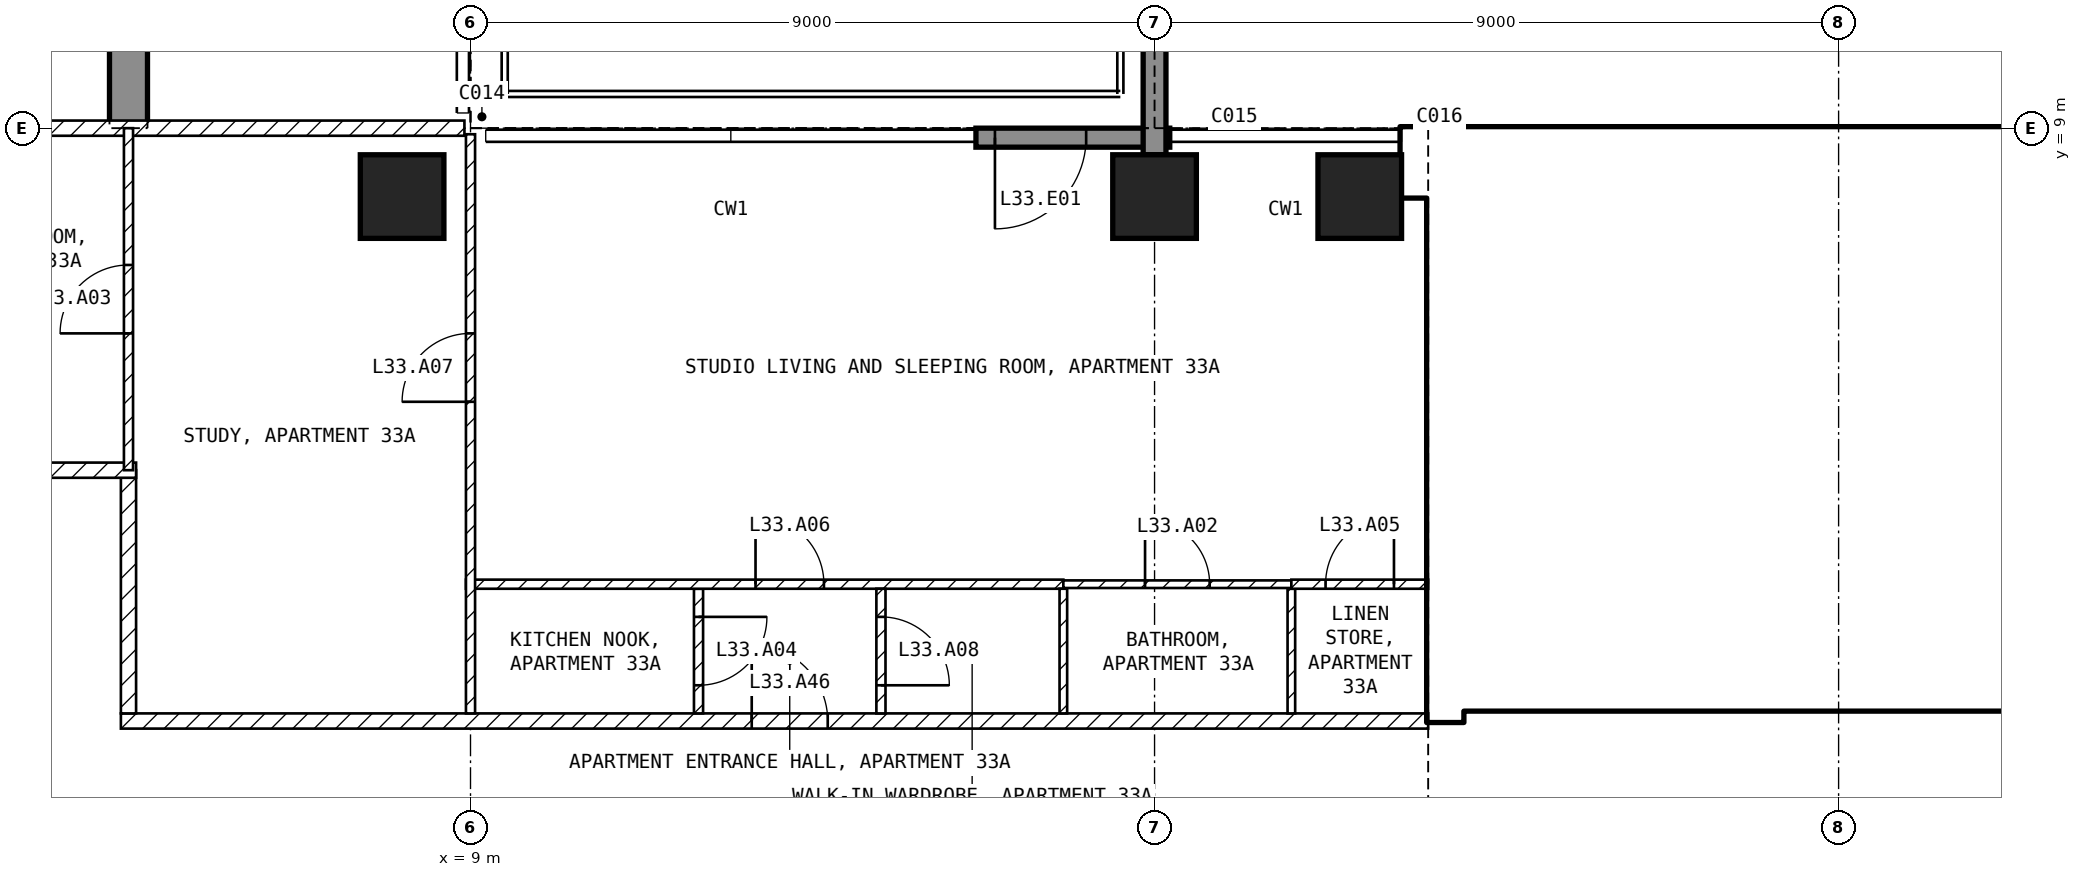
"""IFC4 building model, lengths in metres.
Left out: names, types, materials, properties, quantities, classifications, styles, units other than length and angle.
Written with IfcOpenShell. Run it as: python <this file> out.ifc"""

import sys

from ifc_helpers import new_model, si_unit, direction, frame, frame_2d, origin, origin_2d, place, context, subcontext, project, spatial, polyline, rectangle, outline, extrude, element, fill, save


model = new_model("IFC4")
c1 = context("Model", 3, precision=1e-05, world=origin(), true_north=direction((0.0, 1.0)))
c2 = subcontext(c1, "Body", "Model", "MODEL_VIEW")
j1 = project(units=[si_unit("LENGTHUNIT", "METRE"), si_unit("PLANEANGLEUNIT", "RADIAN")], contexts=[c1])
p1 = place(None, origin())
s1 = spatial("IfcSite", under=j1, at=p1, CompositionType="ELEMENT")
p2 = place(p1, origin())
s2 = spatial("IfcBuilding", under=s1, at=p2, CompositionType="ELEMENT")
p3 = place(p2, frame((0.0, 0.0, 137.4)))
s3 = spatial("IfcBuildingStorey", under=s2, at=p3, CompositionType="ELEMENT", Elevation=137.4)
for number, where, z_axis, x_axis in (
    (1, (8.1, 8.1, -0.25), (0.0, 0.0, 1.0), (1.0, 0.0, 0.0)),
    (2, (18.0, 8.1, -0.25), (0.0, 0.0, 1.0), (1.0, 0.0, 0.0)),
    (3, (20.7, 8.1, -0.25), (0.0, 0.0, 1.0), (1.0, 0.0, 0.0)),
):
    element("IfcColumn", number, at=place(p3, frame(where, z_axis=z_axis, x_axis=x_axis)), inside=s3, PredefinedType="COLUMN", context=c2, shape_type="SweptSolid", body=[
        extrude(rectangle(XDim=1.1, YDim=1.1, at=origin_2d()), origin(), (0.0, 0.0, 1.0), 3.5),
    ])
p4 = place(p3, frame((4.25, 9.0, -0.25), z_axis=(1.0, 0.0, 0.0), x_axis=(0.0, 1.0, 0.0)))
e4 = element("IfcWall", 4, at=p4, inside=s3, PredefinedType="SHEAR", context=c2, shape_type="SweptSolid", body=[
    extrude(outline(polyline([(0.0, 0.0), (2.1, 0.0), (2.1, 2.65), (4.5, 2.65), (4.5, 0.0), (9.9, 0.0), (9.9, 2.65), (12.3, 2.65), (12.3, 0.0), (16.55, 0.0), (16.55, 3.5), (0.0, 3.5), (0.0, 0.0)])), origin(), (0.0, 0.0, 1.0), 0.5),
])
p5 = place(p3, frame((18.2, 8.875, 0.0), z_axis=(0.0, 0.0, 1.0), x_axis=(-1.0, 0.0, 0.0)))
e5 = element("IfcWall", 5, at=p5, inside=s3, PredefinedType="SOLIDWALL", context=c2, shape_type="SweptSolid", body=[
    extrude(rectangle(XDim=2.55, YDim=0.25, at=frame_2d((1.275, 0.0))), origin(), (0.0, 0.0, 1.0), 3.25),
])
p6 = place(p5, frame((1.1, 0.0, 0.0)))
e6 = element("IfcOpeningElement", 6, at=p6, cuts=e5, PredefinedType="OPENING", context=c2, shape_type="SweptSolid", body=[
    extrude(rectangle(XDim=1.2, YDim=2.4, at=frame_2d((0.6, 1.2))), frame((0.0, 0.135, 0.0), z_axis=(0.0, -1.0, 0.0), x_axis=(1.0, 0.0, 0.0)), (0.0, 0.0, 1.0), 0.27),
])
p7 = place(p3, frame((18.0, 8.65, 0.0), z_axis=(0.0, 0.0, 1.0), x_axis=(0.0, 1.0, 0.0)))
e7 = element("IfcWall", 7, at=p7, inside=s3, PredefinedType="SOLIDWALL", context=c2, shape_type="SweptSolid", body=[
    extrude(rectangle(XDim=3.09, YDim=0.3, at=frame_2d((1.545, 0.0))), origin(), (0.0, 0.0, 1.0), 3.25),
])
p8 = place(p3, frame((21.25, 8.55, 0.0), z_axis=(0.0, 0.0, 1.0), x_axis=(1.0, 0.0, 0.0)))
e8 = element("IfcWall", 8, at=p8, inside=s3, PredefinedType="SHEAR", context=c2, shape_type="SweptSolid", body=[
    extrude(rectangle(XDim=8.2, YDim=0.9, at=frame_2d((4.1, 0.0))), origin(), (0.0, 0.0, 1.0), 3.25),
])
p9 = place(p3, frame((21.825, 1.2, 0.0), z_axis=(0.0, 0.0, 1.0), x_axis=(0.0, 1.0, 0.0)))
e9 = element("IfcWall", 9, at=p9, inside=s3, PredefinedType="SHEAR", context=c2, shape_type="SweptSolid", body=[
    extrude(rectangle(XDim=6.9, YDim=0.45, at=frame_2d((3.45, 0.0))), origin(), (0.0, 0.0, 1.0), 3.25),
])
p10 = place(p3, frame((22.05, 1.45, 0.0), z_axis=(0.0, 0.0, 1.0), x_axis=(1.0, 0.0, 0.0)))
e10 = element("IfcWall", 10, at=p10, inside=s3, PredefinedType="SOLIDWALL", context=c2, shape_type="SweptSolid", body=[
    extrude(rectangle(XDim=11.0, YDim=0.2, at=frame_2d((5.5, 0.0))), origin(), (0.0, 0.0, 1.0), 3.25),
])
p11 = place(p10, frame((0.75, 0.0, 0.0)))
e11 = element("IfcOpeningElement", 11, at=p11, cuts=e10, PredefinedType="OPENING", context=c2, shape_type="SweptSolid", body=[
    extrude(rectangle(XDim=1.0, YDim=2.1, at=frame_2d((0.5, 1.05))), frame((0.0, 0.11, 0.0), z_axis=(0.0, -1.0, 0.0), x_axis=(1.0, 0.0, 0.0)), (0.0, 0.0, 1.0), 0.22),
])
p12 = place(p10, frame((3.25, 0.0, 0.0)))
e12 = element("IfcOpeningElement", 12, at=p12, cuts=e10, PredefinedType="OPENING", context=c2, shape_type="SweptSolid", body=[
    extrude(rectangle(XDim=1.0, YDim=2.1, at=frame_2d((0.5, 1.05))), frame((0.0, 0.11, 0.0), z_axis=(0.0, -1.0, 0.0), x_axis=(1.0, 0.0, 0.0)), (0.0, 0.0, 1.0), 0.22),
])
p13 = place(p10, frame((9.075, 0.0, 0.0)))
e13 = element("IfcOpeningElement", 13, at=p13, cuts=e10, PredefinedType="OPENING", context=c2, shape_type="SweptSolid", body=[
    extrude(rectangle(XDim=0.9, YDim=2.1, at=frame_2d((0.45, 1.05))), frame((0.0, 0.11, 0.0), z_axis=(0.0, -1.0, 0.0), x_axis=(1.0, 0.0, 0.0)), (0.0, 0.0, 1.0), 0.22),
])
p14 = place(p3, frame((22.05, 5.15, 0.0), z_axis=(0.0, 0.0, 1.0), x_axis=(1.0, 0.0, 0.0)))
e14 = element("IfcWall", 14, at=p14, inside=s3, PredefinedType="SOLIDWALL", context=c2, shape_type="SweptSolid", body=[
    extrude(rectangle(XDim=6.3, YDim=0.2, at=frame_2d((3.15, 0.0))), origin(), (0.0, 0.0, 1.0), 3.25),
])
p15 = place(p14, frame((0.2, 0.0, 0.0)))
e15 = element("IfcOpeningElement", 15, at=p15, cuts=e14, PredefinedType="OPENING", context=c2, shape_type="SweptSolid", body=[
    extrude(rectangle(XDim=1.0, YDim=2.1, at=frame_2d((0.5, 1.05))), frame((0.0, 0.11, 0.0), z_axis=(0.0, -1.0, 0.0), x_axis=(1.0, 0.0, 0.0)), (0.0, 0.0, 1.0), 0.22),
])
p16 = place(p3, frame((28.25, 5.25, 0.0), z_axis=(0.0, 0.0, 1.0), x_axis=(0.0, 1.0, 0.0)))
e16 = element("IfcWall", 16, at=p16, inside=s3, PredefinedType="SOLIDWALL", context=c2, shape_type="SweptSolid", body=[
    extrude(rectangle(XDim=2.85, YDim=0.2, at=frame_2d((1.425, 0.0))), origin(), (0.0, 0.0, 1.0), 3.25),
])
p17 = place(p3, frame((27.2, 3.95, 0.0), z_axis=(0.0, 0.0, 1.0), x_axis=(1.0, 0.0, 0.0)))
e17 = element("IfcWall", 17, at=p17, inside=s3, PredefinedType="SOLIDWALL", context=c2, shape_type="SweptSolid", body=[
    extrude(rectangle(XDim=5.85, YDim=0.2, at=frame_2d((2.925, 0.0))), origin(), (0.0, 0.0, 1.0), 3.25),
])
p18 = place(p3, frame((27.1, 1.55, 0.0), z_axis=(0.0, 0.0, 1.0), x_axis=(0.0, 1.0, 0.0)))
e18 = element("IfcWall", 18, at=p18, inside=s3, PredefinedType="SOLIDWALL", context=c2, shape_type="SweptSolid", body=[
    extrude(rectangle(XDim=3.5, YDim=0.2, at=frame_2d((1.75, 0.0))), origin(), (0.0, 0.0, 1.0), 3.25),
])
p19 = place(p18, frame((0.6, 0.0, 0.0)))
e19 = element("IfcOpeningElement", 19, at=p19, cuts=e18, PredefinedType="OPENING", context=c2, shape_type="SweptSolid", body=[
    extrude(rectangle(XDim=1.1, YDim=2.1, at=frame_2d((0.55, 1.05))), frame((0.0, 0.11, 0.0), z_axis=(0.0, -1.0, 0.0), x_axis=(1.0, 0.0, 0.0)), (0.0, 0.0, 1.0), 0.22),
])
p20 = place(p18, frame((2.6, 0.0, 0.0)))
e20 = element("IfcOpeningElement", 20, at=p20, cuts=e18, PredefinedType="OPENING", context=c2, shape_type="SweptSolid", body=[
    extrude(rectangle(XDim=0.8, YDim=2.1, at=frame_2d((0.4, 1.05))), frame((0.0, 0.11, 0.0), z_axis=(0.0, -1.0, 0.0), x_axis=(1.0, 0.0, 0.0)), (0.0, 0.0, 1.0), 0.22),
])
p21 = place(p3, frame((4.4, 1.2, 0.0), z_axis=(0.0, 0.0, 1.0), x_axis=(1.0, 0.0, 0.0)))
e21 = element("IfcWall", 21, at=p21, inside=s3, PredefinedType="PARTITIONING", context=c2, shape_type="SweptSolid", body=[
    extrude(rectangle(XDim=17.2, YDim=0.2, at=frame_2d((8.6, 0.0))), origin(), (0.0, 0.0, 1.0), 3.25),
])
p22 = place(p21, frame((8.3, 0.0, 0.0)))
e22 = element("IfcOpeningElement", 22, at=p22, cuts=e21, PredefinedType="OPENING", context=c2, shape_type="SweptSolid", body=[
    extrude(rectangle(XDim=1.0, YDim=2.1, at=frame_2d((0.5, 1.05))), frame((0.0, 0.11, 0.0), z_axis=(0.0, -1.0, 0.0), x_axis=(1.0, 0.0, 0.0)), (0.0, 0.0, 1.0), 0.22),
])
p23 = place(p3, frame((4.5, 4.5, 0.0), z_axis=(0.0, 0.0, 1.0), x_axis=(0.0, -1.0, 0.0)))
e23 = element("IfcWall", 23, at=p23, inside=s3, PredefinedType="PARTITIONING", context=c2, shape_type="SweptSolid", body=[
    extrude(rectangle(XDim=3.2, YDim=0.2, at=frame_2d((1.6, 0.0))), origin(), (0.0, 0.0, 1.0), 3.25),
])
p24 = place(p3, frame((1.1, 4.5, 0.0), z_axis=(0.0, 0.0, 1.0), x_axis=(1.0, 0.0, 0.0)))
e24 = element("IfcWall", 24, at=p24, inside=s3, PredefinedType="PARTITIONING", context=c2, shape_type="SweptSolid", body=[
    extrude(rectangle(XDim=3.5, YDim=0.2, at=frame_2d((1.75, 0.0))), origin(), (0.0, 0.0, 1.0), 3.25),
])
p25 = place(p3, frame((-8.92, 9.0, 0.0), z_axis=(0.0, 0.0, 1.0), x_axis=(1.0, 0.0, 0.0)))
e25 = element("IfcWall", 25, at=p25, inside=s3, PredefinedType="PARTITIONING", context=c2, shape_type="SweptSolid", body=[
    extrude(rectangle(XDim=17.84, YDim=0.2, at=frame_2d((8.92, 0.0))), origin(), (0.0, 0.0, 1.0), 3.25),
])
p26 = place(p25, frame((8.42, 0.0, 0.0)))
e26 = element("IfcOpeningElement", 26, at=p26, cuts=e25, PredefinedType="OPENING", context=c2, shape_type="SweptSolid", body=[
    extrude(rectangle(XDim=1.0, YDim=2.1, at=frame_2d((0.5, 1.05))), frame((0.0, 0.11, 0.0), z_axis=(0.0, -1.0, 0.0), x_axis=(1.0, 0.0, 0.0)), (0.0, 0.0, 1.0), 0.22),
])
p27 = place(p3, frame((12.0, 2.94, 0.0), z_axis=(0.0, 0.0, 1.0), x_axis=(0.0, -1.0, 0.0)))
e27 = element("IfcWall", 27, at=p27, inside=s3, PredefinedType="PARTITIONING", context=c2, shape_type="SweptSolid", body=[
    extrude(rectangle(XDim=1.64, YDim=0.12, at=frame_2d((0.82, 0.0))), origin(), (0.0, 0.0, 1.0), 3.25),
])
p28 = place(p27, frame((0.37, 0.0, 0.0)))
e28 = element("IfcOpeningElement", 28, at=p28, cuts=e27, PredefinedType="OPENING", context=c2, shape_type="SweptSolid", body=[
    extrude(rectangle(XDim=0.9, YDim=2.1, at=frame_2d((0.45, 1.05))), frame((0.0, 0.07, 0.0), z_axis=(0.0, -1.0, 0.0), x_axis=(1.0, 0.0, 0.0)), (0.0, 0.0, 1.0), 0.14),
])
p29 = place(p3, frame((8.94, 3.0, 0.0), z_axis=(0.0, 0.0, 1.0), x_axis=(1.0, 0.0, 0.0)))
e29 = element("IfcWall", 29, at=p29, inside=s3, PredefinedType="PARTITIONING", context=c2, shape_type="SweptSolid", body=[
    extrude(rectangle(XDim=7.86, YDim=0.12, at=frame_2d((3.93, 0.0))), origin(), (0.0, 0.0, 1.0), 3.25),
])
p30 = place(p29, frame((3.81, 0.0, 0.0)))
e30 = element("IfcOpeningElement", 30, at=p30, cuts=e29, PredefinedType="OPENING", context=c2, shape_type="SweptSolid", body=[
    extrude(rectangle(XDim=0.9, YDim=2.1, at=frame_2d((0.45, 1.05))), frame((0.0, 0.07, 0.0), z_axis=(0.0, -1.0, 0.0), x_axis=(1.0, 0.0, 0.0)), (0.0, 0.0, 1.0), 0.14),
])
p31 = place(p3, frame((9.0, 1.3, 0.0), z_axis=(0.0, 0.0, 1.0), x_axis=(0.0, 1.0, 0.0)))
e31 = element("IfcWall", 31, at=p31, inside=s3, PredefinedType="PARTITIONING", context=c2, shape_type="SweptSolid", body=[
    extrude(rectangle(XDim=7.62, YDim=0.12, at=frame_2d((3.81, 0.0))), origin(), (0.0, 0.0, 1.0), 3.25),
])
p32 = place(p31, frame((4.1, 0.0, 0.0)))
e32 = element("IfcOpeningElement", 32, at=p32, cuts=e31, PredefinedType="OPENING", context=c2, shape_type="SweptSolid", body=[
    extrude(rectangle(XDim=0.9, YDim=2.1, at=frame_2d((0.45, 1.05))), frame((0.0, 0.07, 0.0), z_axis=(0.0, -1.0, 0.0), x_axis=(1.0, 0.0, 0.0)), (0.0, 0.0, 1.0), 0.14),
])
p33 = place(p3, frame((14.4, 2.94, 0.0), z_axis=(0.0, 0.0, 1.0), x_axis=(0.0, -1.0, 0.0)))
e33 = element("IfcWall", 33, at=p33, inside=s3, PredefinedType="PARTITIONING", context=c2, shape_type="SweptSolid", body=[
    extrude(rectangle(XDim=1.64, YDim=0.12, at=frame_2d((0.82, 0.0))), origin(), (0.0, 0.0, 1.0), 3.25),
])
p34 = place(p33, frame((0.37, 0.0, 0.0)))
e34 = element("IfcOpeningElement", 34, at=p34, cuts=e33, PredefinedType="OPENING", context=c2, shape_type="SweptSolid", body=[
    extrude(rectangle(XDim=0.9, YDim=2.1, at=frame_2d((0.45, 1.05))), frame((0.0, 0.07, 0.0), z_axis=(0.0, -1.0, 0.0), x_axis=(1.0, 0.0, 0.0)), (0.0, 0.0, 1.0), 0.14),
])
for number, where, z_axis, x_axis in (
    (35, (16.8, 2.94, 0.0), (0.0, 0.0, 1.0), (0.0, -1.0, 0.0)),
    (36, (19.8, 2.94, 0.0), (0.0, 0.0, 1.0), (0.0, -1.0, 0.0)),
):
    element("IfcWall", number, at=place(p3, frame(where, z_axis=z_axis, x_axis=x_axis)), inside=s3, PredefinedType="PARTITIONING", context=c2, shape_type="SweptSolid", body=[
        extrude(rectangle(XDim=1.64, YDim=0.1, at=frame_2d((0.82, 0.0))), origin(), (0.0, 0.0, 1.0), 3.25),
    ])
p35 = place(p3, frame((16.8, 3.0, 0.0), z_axis=(0.0, 0.0, 1.0), x_axis=(1.0, 0.0, 0.0)))
e37 = element("IfcWall", 37, at=p35, inside=s3, PredefinedType="PARTITIONING", context=c2, shape_type="SweptSolid", body=[
    extrude(rectangle(XDim=3.0, YDim=0.1, at=frame_2d((1.5, 0.0))), origin(), (0.0, 0.0, 1.0), 3.25),
])
p36 = place(p35, frame((1.075, 0.0, 0.0)))
e38 = element("IfcOpeningElement", 38, at=p36, cuts=e37, PredefinedType="OPENING", context=c2, shape_type="SweptSolid", body=[
    extrude(rectangle(XDim=0.85, YDim=2.1, at=frame_2d((0.425, 1.05))), frame((0.0, 0.06, 0.0), z_axis=(0.0, -1.0, 0.0), x_axis=(1.0, 0.0, 0.0)), (0.0, 0.0, 1.0), 0.12),
])
p37 = place(p3, frame((19.8, 3.0, 0.0), z_axis=(0.0, 0.0, 1.0), x_axis=(1.0, 0.0, 0.0)))
e39 = element("IfcWall", 39, at=p37, inside=s3, PredefinedType="PARTITIONING", context=c2, shape_type="SweptSolid", body=[
    extrude(rectangle(XDim=1.8, YDim=0.12, at=frame_2d((0.9, 0.0))), origin(), (0.0, 0.0, 1.0), 3.25),
])
p38 = place(p37, frame((0.45, 0.0, 0.0)))
e40 = element("IfcOpeningElement", 40, at=p38, cuts=e39, PredefinedType="OPENING", context=c2, shape_type="SweptSolid", body=[
    extrude(rectangle(XDim=0.9, YDim=2.1, at=frame_2d((0.45, 1.05))), frame((0.0, 0.07, 0.0), z_axis=(0.0, -1.0, 0.0), x_axis=(1.0, 0.0, 0.0)), (0.0, 0.0, 1.0), 0.14),
])
p39 = place(p3, frame((4.5, 4.5, 0.0), z_axis=(0.0, 0.0, 1.0), x_axis=(0.0, 1.0, 0.0)))
e41 = element("IfcWall", 41, at=p39, inside=s3, PredefinedType="PARTITIONING", context=c2, shape_type="SweptSolid", body=[
    extrude(rectangle(XDim=4.5, YDim=0.12, at=frame_2d((2.25, 0.0))), origin(), (0.0, 0.0, 1.0), 3.25),
])
p40 = place(p39, frame((1.8, 0.0, 0.0)))
e42 = element("IfcOpeningElement", 42, at=p40, cuts=e41, PredefinedType="OPENING", context=c2, shape_type="SweptSolid", body=[
    extrude(rectangle(XDim=0.9, YDim=2.1, at=frame_2d((0.45, 1.05))), frame((0.0, 0.07, 0.0), z_axis=(0.0, -1.0, 0.0), x_axis=(1.0, 0.0, 0.0)), (0.0, 0.0, 1.0), 0.14),
])
p41 = place(p6, origin())
e43 = element("IfcDoor", 43, at=p41, inside=s3, OperationType="SINGLE_SWING_RIGHT", PredefinedType="DOOR", context=c2, shape_type="SweptSolid", body=[
    extrude(rectangle(XDim=1.2, YDim=2.4, at=frame_2d((0.6, 1.2))), frame((0.0, 0.025, 0.0), z_axis=(0.0, -1.0, 0.0), x_axis=(1.0, 0.0, 0.0)), (0.0, 0.0, 1.0), 0.05),
])
fill(e6, e43)
p42 = place(p19, origin())
e44 = element("IfcDoor", 44, at=p42, inside=s3, OperationType="DOUBLE_DOOR_SLIDING", PredefinedType="DOOR", context=c2, shape_type="SweptSolid", body=[
    extrude(rectangle(XDim=1.1, YDim=2.1, at=frame_2d((0.55, 1.05))), frame((0.0, 0.025, 0.0), z_axis=(0.0, -1.0, 0.0), x_axis=(1.0, 0.0, 0.0)), (0.0, 0.0, 1.0), 0.05),
])
fill(e19, e44)
p43 = place(p15, origin())
e45 = element("IfcDoor", 45, at=p43, inside=s3, OperationType="SINGLE_SWING_LEFT", PredefinedType="DOOR", context=c2, shape_type="SweptSolid", body=[
    extrude(rectangle(XDim=1.0, YDim=2.1, at=frame_2d((0.5, 1.05))), frame((0.0, 0.025, 0.0), z_axis=(0.0, -1.0, 0.0), x_axis=(1.0, 0.0, 0.0)), (0.0, 0.0, 1.0), 0.05),
])
fill(e15, e45)
p44 = place(p11, origin())
e46 = element("IfcDoor", 46, at=p44, inside=s3, OperationType="SINGLE_SWING_LEFT", PredefinedType="DOOR", context=c2, shape_type="SweptSolid", body=[
    extrude(rectangle(XDim=1.0, YDim=2.1, at=frame_2d((0.5, 1.05))), frame((0.0, 0.025, 0.0), z_axis=(0.0, -1.0, 0.0), x_axis=(1.0, 0.0, 0.0)), (0.0, 0.0, 1.0), 0.05),
])
fill(e11, e46)
p45 = place(p12, origin())
e47 = element("IfcDoor", 47, at=p45, inside=s3, OperationType="SINGLE_SWING_LEFT", PredefinedType="DOOR", context=c2, shape_type="SweptSolid", body=[
    extrude(rectangle(XDim=1.0, YDim=2.1, at=frame_2d((0.5, 1.05))), frame((0.0, 0.025, 0.0), z_axis=(0.0, -1.0, 0.0), x_axis=(1.0, 0.0, 0.0)), (0.0, 0.0, 1.0), 0.05),
])
fill(e12, e47)
p46 = place(p20, origin())
e48 = element("IfcDoor", 48, at=p46, inside=s3, OperationType="SINGLE_SWING_LEFT", PredefinedType="DOOR", context=c2, shape_type="SweptSolid", body=[
    extrude(rectangle(XDim=0.8, YDim=2.1, at=frame_2d((0.4, 1.05))), frame((0.0, 0.025, 0.0), z_axis=(0.0, -1.0, 0.0), x_axis=(1.0, 0.0, 0.0)), (0.0, 0.0, 1.0), 0.05),
])
fill(e20, e48)
p47 = place(p36, origin())
e49 = element("IfcDoor", 49, at=p47, inside=s3, OperationType="SINGLE_SWING_LEFT", PredefinedType="DOOR", context=c2, shape_type="SweptSolid", body=[
    extrude(rectangle(XDim=0.85, YDim=2.1, at=frame_2d((0.425, 1.05))), frame((0.0, 0.025, 0.0), z_axis=(0.0, -1.0, 0.0), x_axis=(1.0, 0.0, 0.0)), (0.0, 0.0, 1.0), 0.05),
])
fill(e38, e49)
p48 = place(p40, origin())
e50 = element("IfcDoor", 50, at=p48, inside=s3, OperationType="SINGLE_SWING_LEFT", PredefinedType="DOOR", context=c2, shape_type="SweptSolid", body=[
    extrude(rectangle(XDim=0.9, YDim=2.1, at=frame_2d((0.45, 1.05))), frame((0.0, 0.025, 0.0), z_axis=(0.0, -1.0, 0.0), x_axis=(1.0, 0.0, 0.0)), (0.0, 0.0, 1.0), 0.05),
])
fill(e42, e50)
p49 = place(p28, origin())
e51 = element("IfcDoor", 51, at=p49, inside=s3, OperationType="SINGLE_SWING_LEFT", PredefinedType="DOOR", context=c2, shape_type="SweptSolid", body=[
    extrude(rectangle(XDim=0.9, YDim=2.1, at=frame_2d((0.45, 1.05))), frame((0.0, 0.025, 0.0), z_axis=(0.0, -1.0, 0.0), x_axis=(1.0, 0.0, 0.0)), (0.0, 0.0, 1.0), 0.05),
])
fill(e28, e51)
p50 = place(p38, origin())
e52 = element("IfcDoor", 52, at=p50, inside=s3, OperationType="SINGLE_SWING_RIGHT", PredefinedType="DOOR", context=c2, shape_type="SweptSolid", body=[
    extrude(rectangle(XDim=0.9, YDim=2.1, at=frame_2d((0.45, 1.05))), frame((0.0, 0.025, 0.0), z_axis=(0.0, -1.0, 0.0), x_axis=(1.0, 0.0, 0.0)), (0.0, 0.0, 1.0), 0.05),
])
fill(e40, e52)
p51 = place(p30, origin())
e53 = element("IfcDoor", 53, at=p51, inside=s3, OperationType="SINGLE_SWING_LEFT", PredefinedType="DOOR", context=c2, shape_type="SweptSolid", body=[
    extrude(rectangle(XDim=0.9, YDim=2.1, at=frame_2d((0.45, 1.05))), frame((0.0, 0.025, 0.0), z_axis=(0.0, -1.0, 0.0), x_axis=(1.0, 0.0, 0.0)), (0.0, 0.0, 1.0), 0.05),
])
fill(e30, e53)
p52 = place(p32, origin())
e54 = element("IfcDoor", 54, at=p52, inside=s3, OperationType="SINGLE_SWING_LEFT", PredefinedType="DOOR", context=c2, shape_type="SweptSolid", body=[
    extrude(rectangle(XDim=0.9, YDim=2.1, at=frame_2d((0.45, 1.05))), frame((0.0, 0.025, 0.0), z_axis=(0.0, -1.0, 0.0), x_axis=(1.0, 0.0, 0.0)), (0.0, 0.0, 1.0), 0.05),
])
fill(e32, e54)
p53 = place(p34, origin())
e55 = element("IfcDoor", 55, at=p53, inside=s3, OperationType="SINGLE_SWING_RIGHT", PredefinedType="DOOR", context=c2, shape_type="SweptSolid", body=[
    extrude(rectangle(XDim=0.9, YDim=2.1, at=frame_2d((0.45, 1.05))), frame((0.0, 0.025, 0.0), z_axis=(0.0, -1.0, 0.0), x_axis=(1.0, 0.0, 0.0)), (0.0, 0.0, 1.0), 0.05),
])
fill(e34, e55)
p54 = place(p22, origin())
e56 = element("IfcDoor", 56, at=p54, inside=s3, OperationType="SINGLE_SWING_LEFT", PredefinedType="DOOR", context=c2, shape_type="SweptSolid", body=[
    extrude(rectangle(XDim=1.0, YDim=2.1, at=frame_2d((0.5, 1.05))), frame((0.0, 0.025, 0.0), z_axis=(0.0, -1.0, 0.0), x_axis=(1.0, 0.0, 0.0)), (0.0, 0.0, 1.0), 0.05),
])
fill(e22, e56)
save(model, sys.argv[1])
